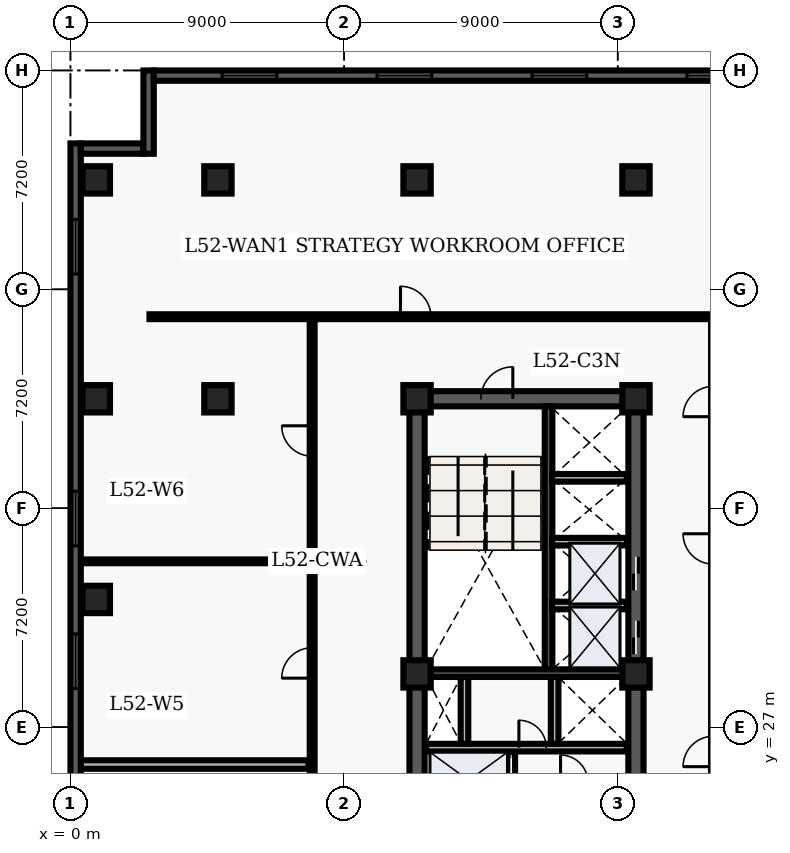
"""IFC4 building model, lengths in metres.
Left out: names, types, materials, properties, quantities, classifications, styles, units other than length and angle.
Written with IfcOpenShell. Run it as: python <this file> out.ifc"""

import sys

from ifc_helpers import new_model, entity, si_unit, converted_unit, direction, frame, origin_with_axes, origin_2d_with_axis, place, context, subcontext, project, spatial, polyline, rectangle, outline, extrude, element, fill, save


model = new_model("IFC4")
c1 = context("Model", 3, precision=1e-05, world=origin_with_axes(), true_north=direction((0.0, 1.0)))
c2 = subcontext(c1, "Body", "Model", "MODEL_VIEW")
j1 = project(units=[si_unit("LENGTHUNIT", "METRE"), converted_unit("PLANEANGLEUNIT", "DEGREE", entity("IfcPlaneAngleMeasure", 0.017), si_unit("PLANEANGLEUNIT", "RADIAN"), dimensions=[0, 0, 0, 0, 0, 0, 0])], contexts=[c1])
p1 = place(None, origin_with_axes())
s1 = spatial("IfcSite", under=j1, at=p1, CompositionType="ELEMENT")
p2 = place(p1, origin_with_axes())
s2 = spatial("IfcBuilding", under=s1, at=p2, CompositionType="ELEMENT")
p3 = place(p2, frame((0.0, 0.0, 212.1), z_axis=(0.0, 0.0, 1.0), x_axis=(1.0, 0.0, 0.0)))
s3 = spatial("IfcBuildingStorey", under=s2, at=p3, CompositionType="ELEMENT", Elevation=212.1)
p4 = place(p3, frame((11.4, 10.8, 0.0), z_axis=(0.0, 0.0, 1.0), x_axis=(0.0, 1.0, 0.0)))
e1 = element("IfcWall", 1, at=p4, inside=s3, PredefinedType="SHEAR", context=c2, shape_type="SweptSolid", body=[
    extrude(outline(polyline([(0.0, -0.25), (27.0, -0.25), (27.0, 0.25), (0.0, 0.25), (0.0, -0.25)])), origin_with_axes(), (0.0, 0.0, 1.0), 3.66),
])
p5 = place(p3, frame((11.4, 37.8, 0.0), z_axis=(0.0, 0.0, 1.0), x_axis=(1.0, 0.0, 0.0)))
e2 = element("IfcWall", 2, at=p5, inside=s3, PredefinedType="SHEAR", context=c2, shape_type="SweptSolid", body=[
    extrude(outline(polyline([(0.0, -0.25), (7.2, -0.25), (7.2, 0.25), (0.0, 0.25), (0.0, -0.25)])), origin_with_axes(), (0.0, 0.0, 1.0), 3.66),
])
p6 = place(p5, frame((2.625, 0.0, 0.0), z_axis=(0.0, 0.0, 1.0), x_axis=(1.0, 0.0, 0.0)))
e3 = element("IfcOpeningElement", 3, at=p6, cuts=e2, PredefinedType="OPENING", context=c2, shape_type="SweptSolid", body=[
    extrude(rectangle(XDim=1.05, YDim=0.52, at=origin_2d_with_axis()), origin_with_axes(), (0.0, 0.0, 1.0), 2.15),
])
p7 = place(p3, frame((18.6, 24.3, 0.0), z_axis=(0.0, 0.0, 1.0), x_axis=(0.0, 1.0, 0.0)))
e4 = element("IfcWall", 4, at=p7, inside=s3, PredefinedType="SHEAR", context=c2, shape_type="SweptSolid", body=[
    extrude(outline(polyline([(0.0, -0.25), (13.5, -0.25), (13.5, 0.25), (0.0, 0.25), (0.0, -0.25)])), origin_with_axes(), (0.0, 0.0, 1.0), 3.66),
])
p8 = place(p7, frame((5.65, 0.0, 0.0), z_axis=(0.0, 0.0, 1.0), x_axis=(1.0, 0.0, 0.0)))
e5 = element("IfcOpeningElement", 5, at=p8, cuts=e4, PredefinedType="OPENING", context=c2, shape_type="SweptSolid", body=[
    extrude(rectangle(XDim=1.1, YDim=0.52, at=origin_2d_with_axis()), origin_with_axes(), (0.0, 0.0, 1.0), 2.15),
])
p9 = place(p7, frame((7.75, 0.0, 0.0), z_axis=(0.0, 0.0, 1.0), x_axis=(1.0, 0.0, 0.0)))
e6 = element("IfcOpeningElement", 6, at=p9, cuts=e4, PredefinedType="OPENING", context=c2, shape_type="SweptSolid", body=[
    extrude(rectangle(XDim=1.1, YDim=0.52, at=origin_2d_with_axis()), origin_with_axes(), (0.0, 0.0, 1.0), 2.15),
])
p10 = place(p3, frame((15.725, 28.9, 0.0), z_axis=(0.0, 0.0, 1.0), x_axis=(0.0, 1.0, 0.0)))
e7 = element("IfcWall", 7, at=p10, inside=s3, PredefinedType="SHEAR", context=c2, shape_type="SweptSolid", body=[
    extrude(outline(polyline([(0.0, -0.125), (8.65, -0.125), (8.65, 0.125), (0.0, 0.125), (0.0, -0.125)])), origin_with_axes(), (0.0, 0.0, 1.0), 3.66),
])
p11 = place(p3, frame((11.65, 28.775, 0.0), z_axis=(0.0, 0.0, 1.0), x_axis=(1.0, 0.0, 0.0)))
e8 = element("IfcWall", 8, at=p11, inside=s3, PredefinedType="SHEAR", context=c2, shape_type="SweptSolid", body=[
    extrude(outline(polyline([(0.0, -0.125), (6.7, -0.125), (6.7, 0.125), (0.0, 0.125), (0.0, -0.125)])), origin_with_axes(), (0.0, 0.0, 1.0), 3.66),
])
p12 = place(p3, frame((14.5, 19.95, 0.0), z_axis=(0.0, 0.0, 1.0), x_axis=(0.0, 1.0, 0.0)))
e9 = element("IfcWall", 9, at=p12, inside=s3, PredefinedType="SOLIDWALL", context=c2, shape_type="SweptSolid", body=[
    extrude(outline(polyline([(0.0, -0.125), (6.25, -0.125), (6.25, 0.125), (0.0, 0.125), (0.0, -0.125)])), origin_with_axes(), (0.0, 0.0, 1.0), 2.7),
])
p13 = place(p12, frame((1.025, 0.0, 0.0), z_axis=(0.0, 0.0, 1.0), x_axis=(1.0, 0.0, 0.0)))
e10 = element("IfcOpeningElement", 10, at=p13, cuts=e9, PredefinedType="OPENING", context=c2, shape_type="SweptSolid", body=[
    extrude(rectangle(XDim=1.1, YDim=0.27, at=origin_2d_with_axis()), origin_with_axes(), (0.0, 0.0, 1.0), 2.15),
])
p14 = place(p12, frame((2.975, 0.0, 0.0), z_axis=(0.0, 0.0, 1.0), x_axis=(1.0, 0.0, 0.0)))
e11 = element("IfcOpeningElement", 11, at=p14, cuts=e9, PredefinedType="OPENING", context=c2, shape_type="SweptSolid", body=[
    extrude(rectangle(XDim=1.1, YDim=0.27, at=origin_2d_with_axis()), origin_with_axes(), (0.0, 0.0, 1.0), 2.15),
])
p15 = place(p12, frame((5.425, 0.0, 0.0), z_axis=(0.0, 0.0, 1.0), x_axis=(1.0, 0.0, 0.0)))
e12 = element("IfcOpeningElement", 12, at=p15, cuts=e9, PredefinedType="OPENING", context=c2, shape_type="SweptSolid", body=[
    extrude(rectangle(XDim=1.2, YDim=0.27, at=origin_2d_with_axis()), origin_with_axes(), (0.0, 0.0, 1.0), 2.15),
])
p16 = place(p3, frame((11.7, 26.325, 0.0), z_axis=(0.0, 0.0, 1.0), x_axis=(1.0, 0.0, 0.0)))
e13 = element("IfcWall", 13, at=p16, inside=s3, PredefinedType="SOLIDWALL", context=c2, shape_type="SweptSolid", body=[
    extrude(outline(polyline([(0.0, -0.125), (6.6, -0.125), (6.6, 0.125), (0.0, 0.125), (0.0, -0.125)])), origin_with_axes(), (0.0, 0.0, 1.0), 2.7),
])
p17 = place(p16, frame((3.5, 0.0, 0.0), z_axis=(0.0, 0.0, 1.0), x_axis=(1.0, 0.0, 0.0)))
e14 = element("IfcOpeningElement", 14, at=p17, cuts=e13, PredefinedType="OPENING", context=c2, shape_type="SweptSolid", body=[
    extrude(rectangle(XDim=0.9, YDim=0.27, at=origin_2d_with_axis()), origin_with_axes(), (0.0, 0.0, 1.0), 2.15),
])
for number, where, z_axis, x_axis in (
    (15, (12.96, 26.45, 0.0), (0.0, 0.0, 1.0), (0.0, 1.0, 0.0)),
    (16, (15.925, 26.45, 0.0), (0.0, 0.0, 1.0), (0.0, 1.0, 0.0)),
):
    element("IfcWall", number, at=place(p3, frame(where, z_axis=z_axis, x_axis=x_axis)), inside=s3, PredefinedType="SOLIDWALL", context=c2, shape_type="SweptSolid", body=[
        extrude(outline(polyline([(0.0, -0.125), (2.2, -0.125), (2.2, 0.125), (0.0, 0.125), (0.0, -0.125)])), origin_with_axes(), (0.0, 0.0, 1.0), 2.7),
    ])
for number, where, z_axis, x_axis in (
    (17, (11.4, 28.75, 0.0), (0.0, 0.0, 1.0), (1.0, 0.0, 0.0)),
    (18, (11.4, 37.8, 0.0), (0.0, 0.0, 1.0), (1.0, 0.0, 0.0)),
    (19, (11.4, 45.0, 0.0), (0.0, 0.0, 1.0), (1.0, 0.0, 0.0)),
    (20, (18.6, 28.75, 0.0), (0.0, 0.0, 1.0), (1.0, 0.0, 0.0)),
    (21, (18.6, 37.8, 0.0), (0.0, 0.0, 1.0), (1.0, 0.0, 0.0)),
    (22, (18.6, 45.0, 0.0), (0.0, 0.0, 1.0), (1.0, 0.0, 0.0)),
    (23, (4.85, 37.8, 0.0), (0.0, 0.0, 1.0), (1.0, 0.0, 0.0)),
    (24, (4.85, 45.0, 0.0), (0.0, 0.0, 1.0), (1.0, 0.0, 0.0)),
    (25, (0.85, 31.2, 0.0), (0.0, 0.0, 1.0), (1.0, 0.0, 0.0)),
    (26, (0.85, 37.8, 0.0), (0.0, 0.0, 1.0), (1.0, 0.0, 0.0)),
    (27, (0.85, 45.0, 0.0), (0.0, 0.0, 1.0), (1.0, 0.0, 0.0)),
):
    element("IfcColumn", number, at=place(p3, frame(where, z_axis=z_axis, x_axis=x_axis)), inside=s3, PredefinedType="COLUMN", context=c2, shape_type="SweptSolid", body=[
        extrude(rectangle(XDim=0.9, YDim=0.9, at=origin_2d_with_axis()), origin_with_axes(), (0.0, 0.0, 1.0), 3.9),
    ])
for number, where, z_axis, x_axis in (
    (28, (15.84, 31.0, 0.0), (0.0, 0.0, 1.0), (1.0, 0.0, 0.0)),
    (29, (15.84, 33.1, 0.0), (0.0, 0.0, 1.0), (1.0, 0.0, 0.0)),
    (30, (15.84, 35.2, 0.0), (0.0, 0.0, 1.0), (1.0, 0.0, 0.0)),
):
    element("IfcWall", number, at=place(p3, frame(where, z_axis=z_axis, x_axis=x_axis)), inside=s3, PredefinedType="SOLIDWALL", context=c2, shape_type="SweptSolid", body=[
        extrude(outline(polyline([(0.0, -0.125), (2.46, -0.125), (2.46, 0.125), (0.0, 0.125), (0.0, -0.125)])), origin_with_axes(), (0.0, 0.0, 1.0), 2.7),
    ])
p18 = place(p3, frame((2.6, 40.5, 0.0), z_axis=(0.0, 0.0, 1.0), x_axis=(1.0, 0.0, 0.0)))
e31 = element("IfcWall", 31, at=p18, inside=s3, PredefinedType="PARTITIONING", context=c2, shape_type="SweptSolid", body=[
    extrude(outline(polyline([(0.0, -0.08), (28.59, -0.08), (28.59, 0.08), (0.0, 0.08), (0.0, -0.08)])), origin_with_axes(), (0.0, 0.0, 1.0), 2.7),
])
p19 = place(p18, frame((8.755, 0.0, 0.0), z_axis=(0.0, 0.0, 1.0), x_axis=(1.0, 0.0, 0.0)))
e32 = element("IfcOpeningElement", 32, at=p19, cuts=e31, PredefinedType="OPENING", context=c2, shape_type="SweptSolid", body=[
    extrude(rectangle(XDim=1.0, YDim=0.18, at=origin_2d_with_axis()), origin_with_axes(), (0.0, 0.0, 1.0), 2.15),
])
p20 = place(p3, frame((7.95, 7.8, 0.0), z_axis=(0.0, 0.0, 1.0), x_axis=(0.0, 1.0, 0.0)))
e33 = element("IfcWall", 33, at=p20, inside=s3, PredefinedType="PARTITIONING", context=c2, shape_type="SweptSolid", body=[
    extrude(outline(polyline([(0.0, -0.08), (32.7, -0.08), (32.7, 0.08), (0.0, 0.08), (0.0, -0.08)])), origin_with_axes(), (0.0, 0.0, 1.0), 2.7),
])
p21 = place(p20, frame((1.915, 0.0, 0.0), z_axis=(0.0, 0.0, 1.0), x_axis=(1.0, 0.0, 0.0)))
e34 = element("IfcOpeningElement", 34, at=p21, cuts=e33, PredefinedType="OPENING", context=c2, shape_type="SweptSolid", body=[
    extrude(rectangle(XDim=1.0, YDim=0.18, at=origin_2d_with_axis()), origin_with_axes(), (0.0, 0.0, 1.0), 2.15),
])
p22 = place(p20, frame((5.705, 0.0, 0.0), z_axis=(0.0, 0.0, 1.0), x_axis=(1.0, 0.0, 0.0)))
e35 = element("IfcOpeningElement", 35, at=p22, cuts=e33, PredefinedType="OPENING", context=c2, shape_type="SweptSolid", body=[
    extrude(rectangle(XDim=1.0, YDim=0.18, at=origin_2d_with_axis()), origin_with_axes(), (0.0, 0.0, 1.0), 2.15),
])
p23 = place(p20, frame((10.066, 0.0, 0.0), z_axis=(0.0, 0.0, 1.0), x_axis=(1.0, 0.0, 0.0)))
e36 = element("IfcOpeningElement", 36, at=p23, cuts=e33, PredefinedType="OPENING", context=c2, shape_type="SweptSolid", body=[
    extrude(rectangle(XDim=1.0, YDim=0.18, at=origin_2d_with_axis()), origin_with_axes(), (0.0, 0.0, 1.0), 2.15),
])
p24 = place(p20, frame((15.195, 0.0, 0.0), z_axis=(0.0, 0.0, 1.0), x_axis=(1.0, 0.0, 0.0)))
e37 = element("IfcOpeningElement", 37, at=p24, cuts=e33, PredefinedType="OPENING", context=c2, shape_type="SweptSolid", body=[
    extrude(rectangle(XDim=1.0, YDim=0.18, at=origin_2d_with_axis()), origin_with_axes(), (0.0, 0.0, 1.0), 2.15),
])
p25 = place(p20, frame((21.311, 0.0, 0.0), z_axis=(0.0, 0.0, 1.0), x_axis=(1.0, 0.0, 0.0)))
e38 = element("IfcOpeningElement", 38, at=p25, cuts=e33, PredefinedType="OPENING", context=c2, shape_type="SweptSolid", body=[
    extrude(rectangle(XDim=1.0, YDim=0.18, at=origin_2d_with_axis()), origin_with_axes(), (0.0, 0.0, 1.0), 2.15),
])
p26 = place(p20, frame((28.611, 0.0, 0.0), z_axis=(0.0, 0.0, 1.0), x_axis=(1.0, 0.0, 0.0)))
e39 = element("IfcOpeningElement", 39, at=p26, cuts=e33, PredefinedType="OPENING", context=c2, shape_type="SweptSolid", body=[
    extrude(rectangle(XDim=1.0, YDim=0.18, at=origin_2d_with_axis()), origin_with_axes(), (0.0, 0.0, 1.0), 2.15),
])
p27 = place(p3, frame((0.335, 25.769, 0.0), z_axis=(0.0, 0.0, 1.0), x_axis=(1.0, 0.0, 0.0)))
e40 = element("IfcWall", 40, at=p27, inside=s3, PredefinedType="PARTITIONING", context=c2, shape_type="SweptSolid", body=[
    extrude(outline(polyline([(0.0, -0.14), (7.495, -0.14), (7.495, 0.14), (0.0, 0.14), (0.0, -0.14)])), origin_with_axes(), (0.0, 0.0, 1.0), 2.7),
])
p28 = place(p3, frame((0.335, 32.453, 0.0), z_axis=(0.0, 0.0, 1.0), x_axis=(1.0, 0.0, 0.0)))
e41 = element("IfcWall", 41, at=p28, inside=s3, PredefinedType="PARTITIONING", context=c2, shape_type="SweptSolid", body=[
    extrude(outline(polyline([(0.0, -0.062), (7.495, -0.062), (7.495, 0.062), (0.0, 0.062), (0.0, -0.062)])), origin_with_axes(), (0.0, 0.0, 1.0), 2.7),
])
p29 = place(p3, frame((0.17, 2.74, 0.0), z_axis=(0.0, 0.0, 1.0), x_axis=(0.0, 1.0, 0.0)))
e42 = element("IfcWall", 42, at=p29, inside=s3, PredefinedType="SOLIDWALL", context=c2, shape_type="SweptSolid", body=[
    extrude(outline(polyline([(0.0, -0.17), (43.46, -0.17), (43.46, 0.17), (0.0, 0.17), (0.0, -0.17)])), origin_with_axes(), (0.0, 0.0, 1.0), 3.66),
])
p30 = place(p29, frame((2.948, 0.0, 0.45), z_axis=(0.0, 0.0, 1.0), x_axis=(1.0, 0.0, 0.0)))
e43 = element("IfcOpeningElement", 43, at=p30, cuts=e42, PredefinedType="OPENING", context=c2, shape_type="SweptSolid", body=[
    extrude(rectangle(XDim=1.8, YDim=0.36, at=origin_2d_with_axis()), origin_with_axes(), (0.0, 0.0, 1.0), 2.1),
])
p31 = place(p29, frame((21.28, 0.0, 0.45), z_axis=(0.0, 0.0, 1.0), x_axis=(1.0, 0.0, 0.0)))
e44 = element("IfcOpeningElement", 44, at=p31, cuts=e42, PredefinedType="OPENING", context=c2, shape_type="SweptSolid", body=[
    extrude(rectangle(XDim=1.8, YDim=0.36, at=origin_2d_with_axis()), origin_with_axes(), (0.0, 0.0, 1.0), 2.1),
])
p32 = place(p29, frame((26.426, 0.0, 0.45), z_axis=(0.0, 0.0, 1.0), x_axis=(1.0, 0.0, 0.0)))
e45 = element("IfcOpeningElement", 45, at=p32, cuts=e42, PredefinedType="OPENING", context=c2, shape_type="SweptSolid", body=[
    extrude(rectangle(XDim=1.8, YDim=0.36, at=origin_2d_with_axis()), origin_with_axes(), (0.0, 0.0, 1.0), 2.1),
])
p33 = place(p29, frame((31.121, 0.0, 0.45), z_axis=(0.0, 0.0, 1.0), x_axis=(1.0, 0.0, 0.0)))
e46 = element("IfcOpeningElement", 46, at=p33, cuts=e42, PredefinedType="OPENING", context=c2, shape_type="SweptSolid", body=[
    extrude(rectangle(XDim=1.8, YDim=0.36, at=origin_2d_with_axis()), origin_with_axes(), (0.0, 0.0, 1.0), 2.1),
])
p34 = place(p29, frame((40.062, 0.0, 0.45), z_axis=(0.0, 0.0, 1.0), x_axis=(1.0, 0.0, 0.0)))
e47 = element("IfcOpeningElement", 47, at=p34, cuts=e42, PredefinedType="OPENING", context=c2, shape_type="SweptSolid", body=[
    extrude(rectangle(XDim=1.8, YDim=0.36, at=origin_2d_with_axis()), origin_with_axes(), (0.0, 0.0, 1.0), 2.1),
])
p35 = place(p3, frame((0.34, 46.03, 0.0), z_axis=(0.0, 0.0, 1.0), x_axis=(1.0, 0.0, 0.0)))
e48 = element("IfcWall", 48, at=p35, inside=s3, PredefinedType="SOLIDWALL", context=c2, shape_type="SweptSolid", body=[
    extrude(outline(polyline([(0.0, -0.17), (2.06, -0.17), (2.06, 0.17), (0.0, 0.17), (0.0, -0.17)])), origin_with_axes(), (0.0, 0.0, 1.0), 3.66),
])
p36 = place(p3, frame((2.57, 45.86, 0.0), z_axis=(0.0, 0.0, 1.0), x_axis=(0.0, 1.0, 0.0)))
e49 = element("IfcWall", 49, at=p36, inside=s3, PredefinedType="SOLIDWALL", context=c2, shape_type="SweptSolid", body=[
    extrude(outline(polyline([(0.0, -0.17), (2.74, -0.17), (2.74, 0.17), (0.0, 0.17), (0.0, -0.17)])), origin_with_axes(), (0.0, 0.0, 1.0), 3.66),
])
p37 = place(p3, frame((2.74, 48.43, 0.0), z_axis=(0.0, 0.0, 1.0), x_axis=(1.0, 0.0, 0.0)))
e50 = element("IfcWall", 50, at=p37, inside=s3, PredefinedType="SOLIDWALL", context=c2, shape_type="SweptSolid", body=[
    extrude(outline(polyline([(0.0, -0.17), (21.585, -0.17), (21.585, 0.17), (0.0, 0.17), (0.0, -0.17)])), origin_with_axes(), (0.0, 0.0, 1.0), 3.66),
])
p38 = place(p37, frame((3.148, 0.0, 0.45), z_axis=(0.0, 0.0, 1.0), x_axis=(1.0, 0.0, 0.0)))
e51 = element("IfcOpeningElement", 51, at=p38, cuts=e50, PredefinedType="OPENING", context=c2, shape_type="SweptSolid", body=[
    extrude(rectangle(XDim=1.8, YDim=0.36, at=origin_2d_with_axis()), origin_with_axes(), (0.0, 0.0, 1.0), 2.1),
])
p39 = place(p37, frame((8.244, 0.0, 0.45), z_axis=(0.0, 0.0, 1.0), x_axis=(1.0, 0.0, 0.0)))
e52 = element("IfcOpeningElement", 52, at=p39, cuts=e50, PredefinedType="OPENING", context=c2, shape_type="SweptSolid", body=[
    extrude(rectangle(XDim=1.8, YDim=0.36, at=origin_2d_with_axis()), origin_with_axes(), (0.0, 0.0, 1.0), 2.1),
])
p40 = place(p37, frame((13.341, 0.0, 0.45), z_axis=(0.0, 0.0, 1.0), x_axis=(1.0, 0.0, 0.0)))
e53 = element("IfcOpeningElement", 53, at=p40, cuts=e50, PredefinedType="OPENING", context=c2, shape_type="SweptSolid", body=[
    extrude(rectangle(XDim=1.8, YDim=0.36, at=origin_2d_with_axis()), origin_with_axes(), (0.0, 0.0, 1.0), 2.1),
])
p41 = place(p37, frame((18.437, 0.0, 0.45), z_axis=(0.0, 0.0, 1.0), x_axis=(1.0, 0.0, 0.0)))
e54 = element("IfcOpeningElement", 54, at=p41, cuts=e50, PredefinedType="OPENING", context=c2, shape_type="SweptSolid", body=[
    extrude(rectangle(XDim=1.8, YDim=0.36, at=origin_2d_with_axis()), origin_with_axes(), (0.0, 0.0, 1.0), 2.1),
])
p42 = place(p7, frame((5.65, 0.0, 0.0), z_axis=(0.0, 0.0, 1.0), x_axis=(1.0, 0.0, 0.0)))
e55 = element("IfcDoor", 55, at=p42, inside=s3, OperationType="SLIDING_TO_LEFT", PredefinedType="DOOR", context=c2, shape_type="SweptSolid", body=[
    extrude(rectangle(XDim=1.1, YDim=0.09, at=origin_2d_with_axis()), origin_with_axes(), (0.0, 0.0, 1.0), 2.15),
])
fill(e5, e55)
p43 = place(p7, frame((7.75, 0.0, 0.0), z_axis=(0.0, 0.0, 1.0), x_axis=(1.0, 0.0, 0.0)))
e56 = element("IfcDoor", 56, at=p43, inside=s3, OperationType="SLIDING_TO_RIGHT", PredefinedType="DOOR", context=c2, shape_type="SweptSolid", body=[
    extrude(rectangle(XDim=1.1, YDim=0.09, at=origin_2d_with_axis()), origin_with_axes(), (0.0, 0.0, 1.0), 2.15),
])
fill(e6, e56)
p44 = place(p12, frame((5.425, 0.0, 0.0), z_axis=(0.0, 0.0, 1.0), x_axis=(1.0, 0.0, 0.0)))
e57 = element("IfcDoor", 57, at=p44, inside=s3, OperationType="DOUBLE_DOOR_SLIDING", PredefinedType="DOOR", context=c2, shape_type="SweptSolid", body=[
    extrude(rectangle(XDim=1.2, YDim=0.09, at=origin_2d_with_axis()), origin_with_axes(), (0.0, 0.0, 1.0), 2.15),
])
fill(e12, e57)
p45 = place(p5, frame((2.625, 0.0, 0.0), z_axis=(0.0, 0.0, 1.0), x_axis=(1.0, 0.0, 0.0)))
e58 = element("IfcDoor", 58, at=p45, inside=s3, OperationType="SINGLE_SWING_RIGHT", PredefinedType="DOOR", context=c2, shape_type="SweptSolid", body=[
    extrude(rectangle(XDim=1.05, YDim=0.09, at=origin_2d_with_axis()), origin_with_axes(), (0.0, 0.0, 1.0), 2.15),
])
fill(e3, e58)
p46 = place(p16, frame((3.5, 0.0, 0.0), z_axis=(0.0, 0.0, 1.0), x_axis=(1.0, 0.0, 0.0)))
e59 = element("IfcDoor", 59, at=p46, inside=s3, OperationType="SINGLE_SWING_LEFT", PredefinedType="DOOR", context=c2, shape_type="SweptSolid", body=[
    extrude(rectangle(XDim=0.9, YDim=0.09, at=origin_2d_with_axis()), origin_with_axes(), (0.0, 0.0, 1.0), 2.15),
])
fill(e14, e59)
p47 = place(p20, frame((21.311, 0.0, 0.0), z_axis=(0.0, 0.0, 1.0), x_axis=(1.0, 0.0, 0.0)))
e60 = element("IfcDoor", 60, at=p47, inside=s3, OperationType="SINGLE_SWING_LEFT", PredefinedType="DOOR", context=c2, shape_type="SweptSolid", body=[
    extrude(rectangle(XDim=1.0, YDim=0.09, at=origin_2d_with_axis()), origin_with_axes(), (0.0, 0.0, 1.0), 2.15),
])
fill(e38, e60)
p48 = place(p20, frame((28.611, 0.0, 0.0), z_axis=(0.0, 0.0, 1.0), x_axis=(1.0, 0.0, 0.0)))
e61 = element("IfcDoor", 61, at=p48, inside=s3, OperationType="SINGLE_SWING_RIGHT", PredefinedType="DOOR", context=c2, shape_type="SweptSolid", body=[
    extrude(rectangle(XDim=1.0, YDim=0.09, at=origin_2d_with_axis()), origin_with_axes(), (0.0, 0.0, 1.0), 2.15),
])
fill(e39, e61)
p49 = place(p18, frame((8.755, 0.0, 0.0), z_axis=(0.0, 0.0, 1.0), x_axis=(1.0, 0.0, 0.0)))
e62 = element("IfcDoor", 62, at=p49, inside=s3, OperationType="SINGLE_SWING_LEFT", PredefinedType="DOOR", context=c2, shape_type="SweptSolid", body=[
    extrude(rectangle(XDim=1.0, YDim=0.09, at=origin_2d_with_axis()), origin_with_axes(), (0.0, 0.0, 1.0), 2.15),
])
fill(e32, e62)
p50 = place(p29, frame((26.426, 0.0, 0.45), z_axis=(0.0, 0.0, 1.0), x_axis=(1.0, 0.0, 0.0)))
e63 = element("IfcWindow", 63, at=p50, inside=s3, PredefinedType="WINDOW", context=c2, shape_type="SweptSolid", body=[
    extrude(rectangle(XDim=1.8, YDim=0.09, at=origin_2d_with_axis()), origin_with_axes(), (0.0, 0.0, 1.0), 2.1),
])
fill(e45, e63)
p51 = place(p29, frame((31.121, 0.0, 0.45), z_axis=(0.0, 0.0, 1.0), x_axis=(1.0, 0.0, 0.0)))
e64 = element("IfcWindow", 64, at=p51, inside=s3, PredefinedType="WINDOW", context=c2, shape_type="SweptSolid", body=[
    extrude(rectangle(XDim=1.8, YDim=0.09, at=origin_2d_with_axis()), origin_with_axes(), (0.0, 0.0, 1.0), 2.1),
])
fill(e46, e64)
p52 = place(p29, frame((40.062, 0.0, 0.45), z_axis=(0.0, 0.0, 1.0), x_axis=(1.0, 0.0, 0.0)))
e65 = element("IfcWindow", 65, at=p52, inside=s3, PredefinedType="WINDOW", context=c2, shape_type="SweptSolid", body=[
    extrude(rectangle(XDim=1.8, YDim=0.09, at=origin_2d_with_axis()), origin_with_axes(), (0.0, 0.0, 1.0), 2.1),
])
fill(e47, e65)
p53 = place(p37, frame((3.148, 0.0, 0.45), z_axis=(0.0, 0.0, 1.0), x_axis=(1.0, 0.0, 0.0)))
e66 = element("IfcWindow", 66, at=p53, inside=s3, PredefinedType="WINDOW", context=c2, shape_type="SweptSolid", body=[
    extrude(rectangle(XDim=1.8, YDim=0.09, at=origin_2d_with_axis()), origin_with_axes(), (0.0, 0.0, 1.0), 2.1),
])
fill(e51, e66)
p54 = place(p37, frame((8.244, 0.0, 0.45), z_axis=(0.0, 0.0, 1.0), x_axis=(1.0, 0.0, 0.0)))
e67 = element("IfcWindow", 67, at=p54, inside=s3, PredefinedType="WINDOW", context=c2, shape_type="SweptSolid", body=[
    extrude(rectangle(XDim=1.8, YDim=0.09, at=origin_2d_with_axis()), origin_with_axes(), (0.0, 0.0, 1.0), 2.1),
])
fill(e52, e67)
p55 = place(p37, frame((13.341, 0.0, 0.45), z_axis=(0.0, 0.0, 1.0), x_axis=(1.0, 0.0, 0.0)))
e68 = element("IfcWindow", 68, at=p55, inside=s3, PredefinedType="WINDOW", context=c2, shape_type="SweptSolid", body=[
    extrude(rectangle(XDim=1.8, YDim=0.09, at=origin_2d_with_axis()), origin_with_axes(), (0.0, 0.0, 1.0), 2.1),
])
fill(e53, e68)
p56 = place(p37, frame((18.437, 0.0, 0.45), z_axis=(0.0, 0.0, 1.0), x_axis=(1.0, 0.0, 0.0)))
e69 = element("IfcWindow", 69, at=p56, inside=s3, PredefinedType="WINDOW", context=c2, shape_type="SweptSolid", body=[
    extrude(rectangle(XDim=1.8, YDim=0.09, at=origin_2d_with_axis()), origin_with_axes(), (0.0, 0.0, 1.0), 2.1),
])
fill(e54, e69)
save(model, sys.argv[1])
